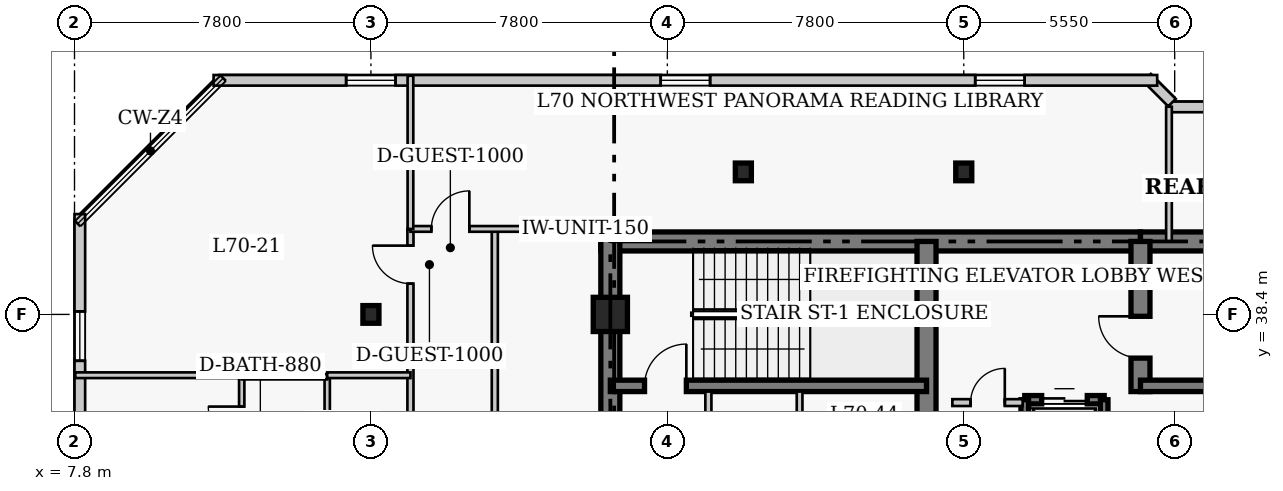
"""IFC4 building model, lengths in metres.
Left out: names, types, materials, properties, quantities, classifications, styles, units other than length and angle.
Written with IfcOpenShell. Run it as: python <this file> out.ifc"""

import sys

from ifc_helpers import new_model, si_unit, direction, frame, frame_2d, origin, origin_2d, place, context, subcontext, project, spatial, rectangle, i_section, extrude, element, fill, save


model = new_model("IFC4")
c1 = context("Model", 3, precision=1e-05, world=origin(), true_north=direction((0.0, 1.0)))
c2 = subcontext(c1, "Body", "Model", "MODEL_VIEW")
j1 = project(units=[si_unit("LENGTHUNIT", "METRE"), si_unit("PLANEANGLEUNIT", "RADIAN")], contexts=[c1])
p1 = place(None, origin())
s1 = spatial("IfcSite", under=j1, at=p1, CompositionType="ELEMENT")
p2 = place(p1, origin())
s2 = spatial("IfcBuilding", under=s1, at=p2, CompositionType="ELEMENT")
p3 = place(p2, frame((0.0, 0.0, 281.4)))
s3 = spatial("IfcBuildingStorey", under=s2, at=p3, CompositionType="ELEMENT", Elevation=281.4)
p4 = place(p3, frame((21.65, 40.32, 0.0), z_axis=(0.0, 0.0, 1.0), x_axis=(1.0, 0.0, 0.0)))
e1 = element("IfcWall", 1, at=p4, inside=s3, PredefinedType="SHEAR", context=c2, shape_type="SweptSolid", body=[
    extrude(rectangle(XDim=14.2, YDim=0.5, at=frame_2d((7.1, 0.0))), origin(), (0.0, 0.0, 1.0), 4.0),
])
p5 = place(p3, frame((35.85, 40.32, 0.0), z_axis=(0.0, 0.0, 1.0), x_axis=(1.0, 0.0, 0.0)))
e2 = element("IfcWall", 2, at=p5, inside=s3, PredefinedType="SHEAR", context=c2, shape_type="SweptSolid", body=[
    extrude(rectangle(XDim=12.6, YDim=0.5, at=frame_2d((6.3, 0.0))), origin(), (0.0, 0.0, 1.0), 4.0),
])
p6 = place(p3, frame((21.9, 27.05, 0.0), z_axis=(0.0, 0.0, 1.0), x_axis=(0.0, 1.0, 0.0)))
e3 = element("IfcWall", 3, at=p6, inside=s3, PredefinedType="SHEAR", context=c2, shape_type="SweptSolid", body=[
    extrude(rectangle(XDim=13.52, YDim=0.5, at=frame_2d((6.76, 0.0))), origin(), (0.0, 0.0, 1.0), 4.0),
])
p7 = place(p3, frame((30.22, 33.0, 0.0), z_axis=(0.0, 0.0, 1.0), x_axis=(0.0, 1.0, 0.0)))
e4 = element("IfcWall", 4, at=p7, inside=s3, PredefinedType="SHEAR", context=c2, shape_type="SweptSolid", body=[
    extrude(rectangle(XDim=7.32, YDim=0.5, at=frame_2d((3.66, 0.0))), origin(), (0.0, 0.0, 1.0), 4.0),
])
p8 = place(p3, frame((35.85, 36.37, 0.0), z_axis=(0.0, 0.0, 1.0), x_axis=(0.0, 1.0, 0.0)))
e5 = element("IfcWall", 5, at=p8, inside=s3, PredefinedType="SHEAR", context=c2, shape_type="SweptSolid", body=[
    extrude(rectangle(XDim=3.95, YDim=0.5, at=frame_2d((1.975, 0.0))), origin(), (0.0, 0.0, 1.0), 4.0),
])
p9 = place(p8, frame((0.88, 0.0, 0.0)))
e6 = element("IfcOpeningElement", 6, at=p9, cuts=e5, PredefinedType="OPENING", context=c2, shape_type="SweptSolid", body=[
    extrude(rectangle(XDim=1.1, YDim=2.15, at=frame_2d((0.55, 1.075))), frame((0.0, 0.26, 0.0), z_axis=(0.0, -1.0, 0.0), x_axis=(1.0, 0.0, 0.0)), (0.0, 0.0, 1.0), 0.52),
])
p10 = place(p3, frame((21.9, 36.52, 0.0), z_axis=(0.0, 0.0, 1.0), x_axis=(1.0, 0.0, 0.0)))
e7 = element("IfcWall", 7, at=p10, inside=s3, PredefinedType="SHEAR", context=c2, shape_type="SweptSolid", body=[
    extrude(rectangle(XDim=8.32, YDim=0.3, at=frame_2d((4.16, 0.0))), origin(), (0.0, 0.0, 1.0), 4.0),
])
p11 = place(p10, frame((0.9, 0.0, 0.0)))
e8 = element("IfcOpeningElement", 8, at=p11, cuts=e7, PredefinedType="OPENING", context=c2, shape_type="SweptSolid", body=[
    extrude(rectangle(XDim=1.1, YDim=2.15, at=frame_2d((0.55, 1.075))), frame((0.0, 0.16, 0.0), z_axis=(0.0, -1.0, 0.0), x_axis=(1.0, 0.0, 0.0)), (0.0, 0.0, 1.0), 0.32),
])
p12 = place(p3, frame((35.85, 36.52, 0.0), z_axis=(0.0, 0.0, 1.0), x_axis=(1.0, 0.0, 0.0)))
e9 = element("IfcWall", 9, at=p12, inside=s3, PredefinedType="SHEAR", context=c2, shape_type="SweptSolid", body=[
    extrude(rectangle(XDim=8.33, YDim=0.3, at=frame_2d((4.165, 0.0))), origin(), (0.0, 0.0, 1.0), 4.0),
])
p13 = place(p3, frame((15.6, 38.4, 0.0), z_axis=(0.0, 0.0, 1.0), x_axis=(1.0, 0.0, 0.0)))
e10 = element("IfcColumn", 10, at=p13, inside=s3, PredefinedType="COLUMN", context=c2, shape_type="SweptSolid", body=[
    extrude(i_section(OverallWidth=0.422, OverallDepth=0.465, WebThickness=0.045, FlangeThickness=0.073, FilletRadius=0.017, at=origin_2d()), origin(), (0.0, 0.0, 1.0), 4.0),
])
p14 = place(p3, frame((21.9, 38.4, 0.0), z_axis=(0.0, 0.0, 1.0), x_axis=(1.0, 0.0, 0.0)))
e11 = element("IfcColumn", 11, at=p14, inside=s3, PredefinedType="COLUMN", context=c2, shape_type="SweptSolid", body=[
    extrude(rectangle(XDim=0.9, YDim=0.9, at=origin_2d()), origin(), (0.0, 0.0, 1.0), 4.0),
])
for number, where, z_axis, x_axis in (
    (12, (25.4, 42.15, 0.0), (0.0, 0.0, 1.0), (1.0, 0.0, 0.0)),
    (13, (31.2, 42.15, 0.0), (0.0, 0.0, 1.0), (1.0, 0.0, 0.0)),
):
    element("IfcColumn", number, at=place(p3, frame(where, z_axis=z_axis, x_axis=x_axis)), inside=s3, PredefinedType="COLUMN", context=c2, shape_type="SweptSolid", body=[
        extrude(i_section(OverallWidth=0.422, OverallDepth=0.465, WebThickness=0.045, FlangeThickness=0.073, FilletRadius=0.017, at=origin_2d()), origin(), (0.0, 0.0, 1.0), 4.0),
    ])
p15 = place(p3, frame((41.39, 43.86, 0.0), z_axis=(0.0, 0.0, 1.0), x_axis=(-1.0, 0.0, 0.0)))
e14 = element("IfcWall", 14, at=p15, inside=s3, PredefinedType="SOLIDWALL", context=c2, shape_type="SweptSolid", body=[
    extrude(rectangle(XDim=4.78, YDim=0.28, at=frame_2d((2.39, 0.0))), origin(), (0.0, 0.0, 1.0), 3.76),
])
p16 = place(p15, frame((1.74, 0.0, 0.85)))
e15 = element("IfcOpeningElement", 15, at=p16, cuts=e14, PredefinedType="OPENING", context=c2, shape_type="SweptSolid", body=[
    extrude(rectangle(XDim=1.3, YDim=1.7, at=frame_2d((0.65, 0.85))), frame((0.0, 0.15, 0.0), z_axis=(0.0, -1.0, 0.0), x_axis=(1.0, 0.0, 0.0)), (0.0, 0.0, 1.0), 0.3),
])
p17 = place(p3, frame((36.679, 43.973, 0.0), z_axis=(0.0, 0.0, 1.0), x_axis=(-0.706975312048, 0.707238225886, 0.0)))
e16 = element("IfcWall", 16, at=p17, inside=s3, PredefinedType="SOLIDWALL", context=c2, shape_type="SweptSolid", body=[
    extrude(rectangle(XDim=0.929, YDim=0.28, at=frame_2d((0.464, 0.0))), origin(), (0.0, 0.0, 1.0), 3.76),
])
p18 = place(p3, frame((36.29, 44.56, 0.0), z_axis=(0.0, 0.0, 1.0), x_axis=(-1.0, 0.0, 0.0)))
e17 = element("IfcWall", 17, at=p18, inside=s3, PredefinedType="SOLIDWALL", context=c2, shape_type="SweptSolid", body=[
    extrude(rectangle(XDim=24.83, YDim=0.28, at=frame_2d((12.415, 0.0))), origin(), (0.0, 0.0, 1.0), 3.76),
])
p19 = place(p18, frame((3.488, 0.0, 0.85)))
e18 = element("IfcOpeningElement", 18, at=p19, cuts=e17, PredefinedType="OPENING", context=c2, shape_type="SweptSolid", body=[
    extrude(rectangle(XDim=1.3, YDim=1.7, at=frame_2d((0.65, 0.85))), frame((0.0, 0.15, 0.0), z_axis=(0.0, -1.0, 0.0), x_axis=(1.0, 0.0, 0.0)), (0.0, 0.0, 1.0), 0.3),
])
p20 = place(p18, frame((11.765, 0.0, 0.85)))
e19 = element("IfcOpeningElement", 19, at=p20, cuts=e17, PredefinedType="OPENING", context=c2, shape_type="SweptSolid", body=[
    extrude(rectangle(XDim=1.3, YDim=1.7, at=frame_2d((0.65, 0.85))), frame((0.0, 0.15, 0.0), z_axis=(0.0, -1.0, 0.0), x_axis=(1.0, 0.0, 0.0)), (0.0, 0.0, 1.0), 0.3),
])
p21 = place(p18, frame((20.042, 0.0, 0.85)))
e20 = element("IfcOpeningElement", 20, at=p21, cuts=e17, PredefinedType="OPENING", context=c2, shape_type="SweptSolid", body=[
    extrude(rectangle(XDim=1.3, YDim=1.7, at=frame_2d((0.65, 0.85))), frame((0.0, 0.15, 0.0), z_axis=(0.0, -1.0, 0.0), x_axis=(1.0, 0.0, 0.0)), (0.0, 0.0, 1.0), 0.3),
])
p22 = place(p3, frame((7.94, 41.04, 0.0), z_axis=(0.0, 0.0, 1.0), x_axis=(0.0, -1.0, 0.0)))
e21 = element("IfcWall", 21, at=p22, inside=s3, PredefinedType="SOLIDWALL", context=c2, shape_type="SweptSolid", body=[
    extrude(rectangle(XDim=30.88, YDim=0.28, at=frame_2d((15.44, 0.0))), origin(), (0.0, 0.0, 1.0), 3.76),
])
p23 = place(p22, frame((2.56, 0.0, 0.85)))
e22 = element("IfcOpeningElement", 22, at=p23, cuts=e21, PredefinedType="OPENING", context=c2, shape_type="SweptSolid", body=[
    extrude(rectangle(XDim=1.3, YDim=1.7, at=frame_2d((0.65, 0.85))), frame((0.0, 0.15, 0.0), z_axis=(0.0, -1.0, 0.0), x_axis=(1.0, 0.0, 0.0)), (0.0, 0.0, 1.0), 0.3),
])
p24 = place(p22, frame((10.28, 0.0, 0.85)))
e23 = element("IfcOpeningElement", 23, at=p24, cuts=e21, PredefinedType="OPENING", context=c2, shape_type="SweptSolid", body=[
    extrude(rectangle(XDim=1.3, YDim=1.7, at=frame_2d((0.65, 0.85))), frame((0.0, 0.15, 0.0), z_axis=(0.0, -1.0, 0.0), x_axis=(1.0, 0.0, 0.0)), (0.0, 0.0, 1.0), 0.3),
])
p25 = place(p22, frame((18.65, 0.0, 0.85)))
e24 = element("IfcOpeningElement", 24, at=p25, cuts=e21, PredefinedType="OPENING", context=c2, shape_type="SweptSolid", body=[
    extrude(rectangle(XDim=1.3, YDim=1.7, at=frame_2d((0.65, 0.85))), frame((0.0, 0.15, 0.0), z_axis=(0.0, -1.0, 0.0), x_axis=(1.0, 0.0, 0.0)), (0.0, 0.0, 1.0), 0.3),
])
p26 = place(p22, frame((26.37, 0.0, 0.85)))
e25 = element("IfcOpeningElement", 25, at=p26, cuts=e21, PredefinedType="OPENING", context=c2, shape_type="SweptSolid", body=[
    extrude(rectangle(XDim=1.3, YDim=1.7, at=frame_2d((0.65, 0.85))), frame((0.0, 0.15, 0.0), z_axis=(0.0, -1.0, 0.0), x_axis=(1.0, 0.0, 0.0)), (0.0, 0.0, 1.0), 0.3),
])
p27 = place(p3, frame((32.805, 36.155, 0.0), z_axis=(0.0, 0.0, 1.0), x_axis=(1.0, 0.0, 0.0)))
e26 = element("IfcWall", 26, at=p27, inside=s3, PredefinedType="SHEAR", context=c2, shape_type="SweptSolid", body=[
    extrude(rectangle(XDim=2.09, YDim=0.22, at=frame_2d((1.045, 0.0))), origin(), (0.0, 0.0, 1.0), 4.0),
])
p28 = place(p27, frame((0.445, 0.0, 0.0)))
e27 = element("IfcOpeningElement", 27, at=p28, cuts=e26, PredefinedType="OPENING", context=c2, shape_type="SweptSolid", body=[
    extrude(rectangle(XDim=1.2, YDim=2.15, at=frame_2d((0.6, 1.075))), frame((0.0, 0.12, 0.0), z_axis=(0.0, -1.0, 0.0), x_axis=(1.0, 0.0, 0.0)), (0.0, 0.0, 1.0), 0.24),
])
for number, where, z_axis, x_axis in (
    (28, (32.805, 33.245, 0.0), (0.0, 0.0, 1.0), (0.0, 1.0, 0.0)),
    (29, (34.895, 33.245, 0.0), (0.0, 0.0, 1.0), (0.0, 1.0, 0.0)),
):
    element("IfcWall", number, at=place(p3, frame(where, z_axis=z_axis, x_axis=x_axis)), inside=s3, PredefinedType="SHEAR", context=c2, shape_type="SweptSolid", body=[
        extrude(rectangle(XDim=2.91, YDim=0.2, at=frame_2d((1.455, 0.0))), origin(), (0.0, 0.0, 1.0), 4.0),
    ])
p29 = place(p3, frame((30.9, 36.08, 0.0), z_axis=(0.0, 0.0, 1.0), x_axis=(1.0, 0.0, 0.0)))
e30 = element("IfcWall", 30, at=p29, inside=s3, PredefinedType="PARTITIONING", context=c2, shape_type="SweptSolid", body=[
    extrude(rectangle(XDim=1.85, YDim=0.18, at=frame_2d((0.925, 0.0))), origin(), (0.0, 0.0, 1.0), 3.76),
])
p30 = place(p29, frame((0.48, 0.0, 0.0)))
e31 = element("IfcOpeningElement", 31, at=p30, cuts=e30, PredefinedType="OPENING", context=c2, shape_type="SweptSolid", body=[
    extrude(rectangle(XDim=0.9, YDim=2.15, at=frame_2d((0.45, 1.075))), frame((0.0, 0.1, 0.0), z_axis=(0.0, -1.0, 0.0), x_axis=(1.0, 0.0, 0.0)), (0.0, 0.0, 1.0), 0.2),
])
p31 = place(p3, frame((24.48, 32.8, 0.0), z_axis=(0.0, 0.0, 1.0), x_axis=(0.0, 1.0, 0.0)))
e32 = element("IfcWall", 32, at=p31, inside=s3, PredefinedType="PARTITIONING", context=c2, shape_type="SweptSolid", body=[
    extrude(rectangle(XDim=3.57, YDim=0.16, at=frame_2d((1.785, 0.0))), origin(), (0.0, 0.0, 1.0), 3.76),
])
p32 = place(p31, frame((1.604, 0.0, 0.0)))
e33 = element("IfcOpeningElement", 33, at=p32, cuts=e32, PredefinedType="OPENING", context=c2, shape_type="SweptSolid", body=[
    extrude(rectangle(XDim=0.9, YDim=2.1, at=frame_2d((0.45, 1.05))), frame((0.0, 0.09, 0.0), z_axis=(0.0, -1.0, 0.0), x_axis=(1.0, 0.0, 0.0)), (0.0, 0.0, 1.0), 0.18),
])
p33 = place(p3, frame((26.88, 32.75, 0.0), z_axis=(0.0, 0.0, 1.0), x_axis=(0.0, 1.0, 0.0)))
e34 = element("IfcWall", 34, at=p33, inside=s3, PredefinedType="PARTITIONING", context=c2, shape_type="SweptSolid", body=[
    extrude(rectangle(XDim=3.62, YDim=0.15, at=frame_2d((1.81, 0.0))), origin(), (0.0, 0.0, 1.0), 3.76),
])
p34 = place(p3, frame((16.64, 8.55, 0.0), z_axis=(0.0, 0.0, 1.0), x_axis=(0.0, 1.0, 0.0)))
e35 = element("IfcWall", 35, at=p34, inside=s3, PredefinedType="PARTITIONING", context=c2, shape_type="SweptSolid", body=[
    extrude(rectangle(XDim=32.1, YDim=0.16, at=frame_2d((16.05, 0.0))), origin(), (0.0, 0.0, 1.0), 3.76),
])
p35 = place(p34, frame((5.25, 0.0, 0.0)))
e36 = element("IfcOpeningElement", 36, at=p35, cuts=e35, PredefinedType="OPENING", context=c2, shape_type="SweptSolid", body=[
    extrude(rectangle(XDim=0.95, YDim=2.1, at=frame_2d((0.475, 1.05))), frame((0.0, 0.09, 0.0), z_axis=(0.0, -1.0, 0.0), x_axis=(1.0, 0.0, 0.0)), (0.0, 0.0, 1.0), 0.18),
])
p36 = place(p34, frame((15.375, 0.0, 0.0)))
e37 = element("IfcOpeningElement", 37, at=p36, cuts=e35, PredefinedType="OPENING", context=c2, shape_type="SweptSolid", body=[
    extrude(rectangle(XDim=0.95, YDim=2.1, at=frame_2d((0.475, 1.05))), frame((0.0, 0.09, 0.0), z_axis=(0.0, -1.0, 0.0), x_axis=(1.0, 0.0, 0.0)), (0.0, 0.0, 1.0), 0.18),
])
p37 = place(p34, frame((23.775, 0.0, 0.0)))
e38 = element("IfcOpeningElement", 38, at=p37, cuts=e35, PredefinedType="OPENING", context=c2, shape_type="SweptSolid", body=[
    extrude(rectangle(XDim=0.95, YDim=2.1, at=frame_2d((0.475, 1.05))), frame((0.0, 0.09, 0.0), z_axis=(0.0, -1.0, 0.0), x_axis=(1.0, 0.0, 0.0)), (0.0, 0.0, 1.0), 0.18),
])
p38 = place(p34, frame((30.66, 0.0, 0.0)))
e39 = element("IfcOpeningElement", 39, at=p38, cuts=e35, PredefinedType="OPENING", context=c2, shape_type="SweptSolid", body=[
    extrude(rectangle(XDim=1.0, YDim=2.15, at=frame_2d((0.5, 1.075))), frame((0.0, 0.09, 0.0), z_axis=(0.0, -1.0, 0.0), x_axis=(1.0, 0.0, 0.0)), (0.0, 0.0, 1.0), 0.18),
])
p39 = place(p3, frame((18.86, 35.02, 0.0), z_axis=(0.0, 0.0, 1.0), x_axis=(0.0, 1.0, 0.0)))
e40 = element("IfcWall", 40, at=p39, inside=s3, PredefinedType="PARTITIONING", context=c2, shape_type="SweptSolid", body=[
    extrude(rectangle(XDim=5.63, YDim=0.16, at=frame_2d((2.815, 0.0))), origin(), (0.0, 0.0, 1.0), 3.76),
])
p40 = place(p3, frame((16.64, 40.65, 0.0), z_axis=(0.0, 0.0, 1.0), x_axis=(1.0, 0.0, 0.0)))
e41 = element("IfcWall", 41, at=p40, inside=s3, PredefinedType="PARTITIONING", context=c2, shape_type="SweptSolid", body=[
    extrude(rectangle(XDim=5.46, YDim=0.15, at=frame_2d((2.73, 0.0))), origin(), (0.0, 0.0, 1.0), 3.76),
])
p41 = place(p40, frame((0.55, 0.0, 0.0)))
e42 = element("IfcOpeningElement", 42, at=p41, cuts=e41, PredefinedType="OPENING", context=c2, shape_type="SweptSolid", body=[
    extrude(rectangle(XDim=1.0, YDim=2.15, at=frame_2d((0.5, 1.075))), frame((0.0, 0.085, 0.0), z_axis=(0.0, -1.0, 0.0), x_axis=(1.0, 0.0, 0.0)), (0.0, 0.0, 1.0), 0.17),
])
p42 = place(p3, frame((16.64, 40.65, 0.0), z_axis=(0.0, 0.0, 1.0), x_axis=(0.0, 1.0, 0.0)))
e43 = element("IfcWall", 43, at=p42, inside=s3, PredefinedType="PARTITIONING", context=c2, shape_type="SweptSolid", body=[
    extrude(rectangle(XDim=4.03, YDim=0.15, at=frame_2d((2.015, 0.0))), origin(), (0.0, 0.0, 1.0), 3.76),
])
p43 = place(p3, frame((36.6, 40.32, 0.0), z_axis=(0.0, 0.0, 1.0), x_axis=(0.0, 1.0, 0.0)))
e44 = element("IfcWall", 44, at=p43, inside=s3, PredefinedType="PARTITIONING", context=c2, shape_type="SweptSolid", body=[
    extrude(rectangle(XDim=3.545, YDim=0.15, at=frame_2d((1.772, 0.0))), origin(), (0.0, 0.0, 1.0), 3.76),
])
p44 = place(p3, frame((12.2, 34.31, 0.0), z_axis=(0.0, 0.0, 1.0), x_axis=(0.0, 1.0, 0.0)))
e45 = element("IfcWall", 45, at=p44, inside=s3, PredefinedType="PLUMBINGWALL", context=c2, shape_type="SweptSolid", body=[
    extrude(rectangle(XDim=2.45, YDim=0.14, at=frame_2d((1.225, 0.0))), origin(), (0.0, 0.0, 1.0), 3.76),
])
p45 = place(p44, frame((0.785, 0.0, 0.0)))
e46 = element("IfcOpeningElement", 46, at=p45, cuts=e45, PredefinedType="OPENING", context=c2, shape_type="SweptSolid", body=[
    extrude(rectangle(XDim=0.88, YDim=2.05, at=frame_2d((0.44, 1.025))), frame((0.0, 0.08, 0.0), z_axis=(0.0, -1.0, 0.0), x_axis=(1.0, 0.0, 0.0)), (0.0, 0.0, 1.0), 0.16),
])
p46 = place(p3, frame((14.45, 34.31, 0.0), z_axis=(0.0, 0.0, 1.0), x_axis=(0.0, 1.0, 0.0)))
e47 = element("IfcWall", 47, at=p46, inside=s3, PredefinedType="PLUMBINGWALL", context=c2, shape_type="SweptSolid", body=[
    extrude(rectangle(XDim=2.45, YDim=0.14, at=frame_2d((1.225, 0.0))), origin(), (0.0, 0.0, 1.0), 3.76),
])
p47 = place(p3, frame((12.2, 36.76, 0.0), z_axis=(0.0, 0.0, 1.0), x_axis=(1.0, 0.0, 0.0)))
e48 = element("IfcWall", 48, at=p47, inside=s3, PredefinedType="PLUMBINGWALL", context=c2, shape_type="SweptSolid", body=[
    extrude(rectangle(XDim=2.25, YDim=0.14, at=frame_2d((1.125, 0.0))), origin(), (0.0, 0.0, 1.0), 3.76),
])
p48 = place(p3, frame((7.82, 36.8, 0.0), z_axis=(0.0, 0.0, 1.0), x_axis=(1.0, 0.0, 0.0)))
e49 = element("IfcWall", 49, at=p48, inside=s3, PredefinedType="PARTITIONING", context=c2, shape_type="SweptSolid", body=[
    extrude(rectangle(XDim=4.38, YDim=0.15, at=frame_2d((2.19, 0.0))), origin(), (0.0, 0.0, 1.0), 3.76),
])
p49 = place(p3, frame((14.45, 36.8, 0.0), z_axis=(0.0, 0.0, 1.0), x_axis=(1.0, 0.0, 0.0)))
e50 = element("IfcWall", 50, at=p49, inside=s3, PredefinedType="PARTITIONING", context=c2, shape_type="SweptSolid", body=[
    extrude(rectangle(XDim=2.19, YDim=0.15, at=frame_2d((1.095, 0.0))), origin(), (0.0, 0.0, 1.0), 3.76),
])
p50 = place(p19, origin())
e51 = element("IfcWindow", 51, at=p50, inside=s3, PartitioningType="SINGLE_PANEL", PredefinedType="WINDOW", context=c2, shape_type="SweptSolid", body=[
    extrude(rectangle(XDim=1.3, YDim=1.7, at=frame_2d((0.65, 0.85))), frame((0.0, 0.03, 0.0), z_axis=(0.0, -1.0, 0.0), x_axis=(1.0, 0.0, 0.0)), (0.0, 0.0, 1.0), 0.06),
])
fill(e18, e51)
p51 = place(p20, origin())
e52 = element("IfcWindow", 52, at=p51, inside=s3, PartitioningType="SINGLE_PANEL", PredefinedType="WINDOW", context=c2, shape_type="SweptSolid", body=[
    extrude(rectangle(XDim=1.3, YDim=1.7, at=frame_2d((0.65, 0.85))), frame((0.0, 0.03, 0.0), z_axis=(0.0, -1.0, 0.0), x_axis=(1.0, 0.0, 0.0)), (0.0, 0.0, 1.0), 0.06),
])
fill(e19, e52)
p52 = place(p21, origin())
e53 = element("IfcWindow", 53, at=p52, inside=s3, PartitioningType="SINGLE_PANEL", PredefinedType="WINDOW", context=c2, shape_type="SweptSolid", body=[
    extrude(rectangle(XDim=1.3, YDim=1.7, at=frame_2d((0.65, 0.85))), frame((0.0, 0.03, 0.0), z_axis=(0.0, -1.0, 0.0), x_axis=(1.0, 0.0, 0.0)), (0.0, 0.0, 1.0), 0.06),
])
fill(e20, e53)
p53 = place(p23, origin())
e54 = element("IfcWindow", 54, at=p53, inside=s3, PartitioningType="SINGLE_PANEL", PredefinedType="WINDOW", context=c2, shape_type="SweptSolid", body=[
    extrude(rectangle(XDim=1.3, YDim=1.7, at=frame_2d((0.65, 0.85))), frame((0.0, 0.03, 0.0), z_axis=(0.0, -1.0, 0.0), x_axis=(1.0, 0.0, 0.0)), (0.0, 0.0, 1.0), 0.06),
])
fill(e22, e54)
p54 = place(p28, origin())
e55 = element("IfcDoor", 55, at=p54, inside=s3, OperationType="DOUBLE_DOOR_SLIDING", PredefinedType="DOOR", context=c2, shape_type="SweptSolid", body=[
    extrude(rectangle(XDim=1.2, YDim=2.15, at=frame_2d((0.6, 1.075))), frame((0.0, 0.025, 0.0), z_axis=(0.0, -1.0, 0.0), x_axis=(1.0, 0.0, 0.0)), (0.0, 0.0, 1.0), 0.05),
])
fill(e27, e55)
p55 = place(p30, origin())
e56 = element("IfcDoor", 56, at=p55, inside=s3, OperationType="SINGLE_SWING_RIGHT", PredefinedType="DOOR", context=c2, shape_type="SweptSolid", body=[
    extrude(rectangle(XDim=0.9, YDim=2.15, at=frame_2d((0.45, 1.075))), frame((0.0, 0.025, 0.0), z_axis=(0.0, -1.0, 0.0), x_axis=(1.0, 0.0, 0.0)), (0.0, 0.0, 1.0), 0.05),
])
fill(e31, e56)
p56 = place(p41, origin())
e57 = element("IfcDoor", 57, at=p56, inside=s3, OperationType="SINGLE_SWING_RIGHT", PredefinedType="DOOR", context=c2, shape_type="SweptSolid", body=[
    extrude(rectangle(XDim=1.0, YDim=2.15, at=frame_2d((0.5, 1.075))), frame((0.0, 0.025, 0.0), z_axis=(0.0, -1.0, 0.0), x_axis=(1.0, 0.0, 0.0)), (0.0, 0.0, 1.0), 0.05),
])
fill(e42, e57)
p57 = place(p45, origin())
e58 = element("IfcDoor", 58, at=p57, inside=s3, OperationType="SINGLE_SWING_RIGHT", PredefinedType="DOOR", context=c2, shape_type="SweptSolid", body=[
    extrude(rectangle(XDim=0.88, YDim=2.05, at=frame_2d((0.44, 1.025))), frame((0.0, 0.025, 0.0), z_axis=(0.0, -1.0, 0.0), x_axis=(1.0, 0.0, 0.0)), (0.0, 0.0, 1.0), 0.05),
])
fill(e46, e58)
p58 = place(p38, origin())
e59 = element("IfcDoor", 59, at=p58, inside=s3, OperationType="SINGLE_SWING_RIGHT", PredefinedType="DOOR", context=c2, shape_type="SweptSolid", body=[
    extrude(rectangle(XDim=1.0, YDim=2.15, at=frame_2d((0.5, 1.075))), frame((0.0, 0.025, 0.0), z_axis=(0.0, -1.0, 0.0), x_axis=(1.0, 0.0, 0.0)), (0.0, 0.0, 1.0), 0.05),
])
fill(e39, e59)
p59 = place(p11, origin())
e60 = element("IfcDoor", 60, at=p59, inside=s3, OperationType="SINGLE_SWING_RIGHT", PredefinedType="DOOR", context=c2, shape_type="SweptSolid", body=[
    extrude(rectangle(XDim=1.1, YDim=2.15, at=frame_2d((0.55, 1.075))), frame((0.0, 0.025, 0.0), z_axis=(0.0, -1.0, 0.0), x_axis=(1.0, 0.0, 0.0)), (0.0, 0.0, 1.0), 0.05),
])
fill(e8, e60)
p60 = place(p9, origin())
e61 = element("IfcDoor", 61, at=p60, inside=s3, OperationType="SINGLE_SWING_RIGHT", PredefinedType="DOOR", context=c2, shape_type="SweptSolid", body=[
    extrude(rectangle(XDim=1.1, YDim=2.15, at=frame_2d((0.55, 1.075))), frame((0.0, 0.025, 0.0), z_axis=(0.0, -1.0, 0.0), x_axis=(1.0, 0.0, 0.0)), (0.0, 0.0, 1.0), 0.05),
])
fill(e6, e61)
save(model, sys.argv[1])
